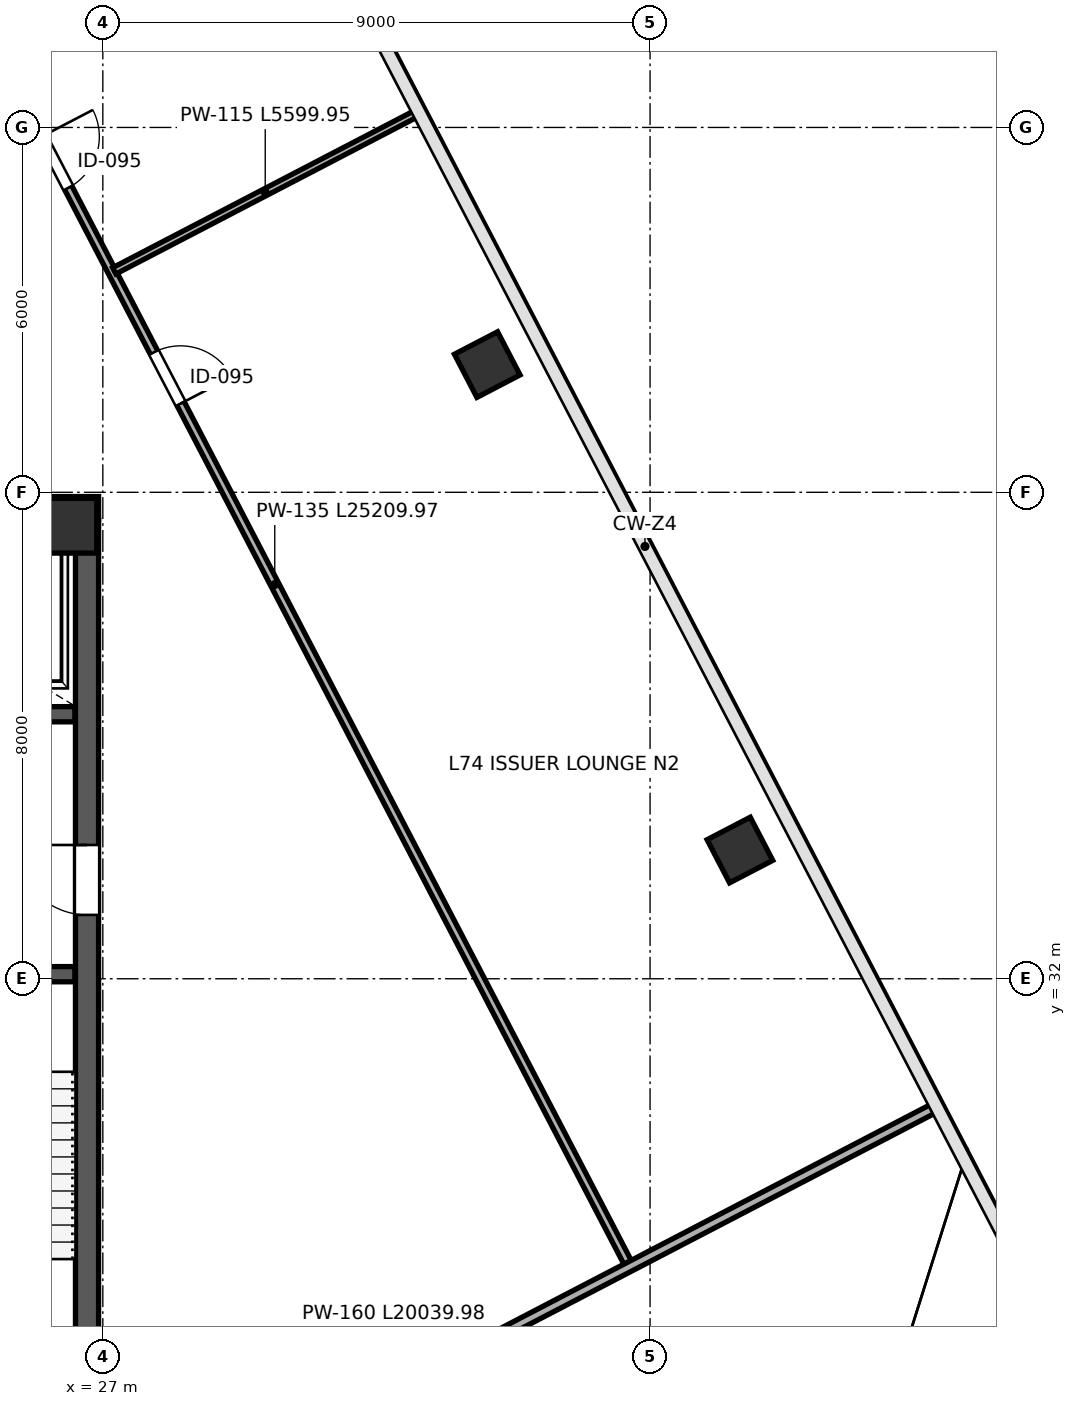
"""IFC4 building model, lengths in metres.
Left out: names, types, materials, properties, quantities, classifications, styles, units other than length and angle.
Written with IfcOpenShell. Run it as: python <this file> out.ifc"""

import sys

from ifc_helpers import new_model, si_unit, direction, frame, frame_2d, origin, origin_2d, place, context, subcontext, project, spatial, rectangle, extrude, source, transform, mapped, element, fill, save


model = new_model("IFC4")
c1 = context("Model", 3, precision=1e-05, world=origin(), true_north=direction((0.0, 1.0)))
c2 = subcontext(c1, "Body", "Model", "MODEL_VIEW")
j1 = project(units=[si_unit("LENGTHUNIT", "METRE"), si_unit("PLANEANGLEUNIT", "RADIAN")], contexts=[c1])
p1 = place(None, origin())
s1 = spatial("IfcSite", under=j1, at=p1, CompositionType="ELEMENT")
p2 = place(p1, origin())
s2 = spatial("IfcBuilding", under=s1, at=p2, CompositionType="ELEMENT")
p3 = place(p2, frame((0.0, 0.0, 328.2)))
s3 = spatial("IfcBuildingStorey", under=s2, at=p3, CompositionType="ELEMENT", Elevation=328.2)
m1 = source(origin(), c2, "Body", "SweptSolid", [
    extrude(rectangle(XDim=0.9, YDim=0.9, at=origin_2d()), origin(), (0.0, 0.0, 1.0), 4.198),
])
p4 = place(p3, frame((26.45, 39.45, 0.001), z_axis=(0.0, 0.0, 1.0), x_axis=(1.0, 0.0, 0.0)))
e1 = element("IfcColumn", 1, at=p4, inside=s3, PredefinedType="COLUMN", context=c2, shape_type="MappedRepresentation", body=[
    mapped(m1, transform((0.0, 0.0, 0.0), scale=1.0)),
])
m2 = source(origin(), c2, "Body", "SweptSolid", [
    extrude(rectangle(XDim=0.8, YDim=0.8, at=origin_2d()), origin(), (0.0, 0.0, 1.0), 4.198),
])
for number, where, z_axis, x_axis in (
    (2, (33.322, 42.1, 0.001), (0.0, 0.0, 1.0), (-0.462, 0.887, 0.0)),
    (3, (37.478, 34.117, 0.001), (0.0, 0.0, 1.0), (-0.462, 0.887, 0.0)),
):
    element("IfcColumn", number, at=place(p3, frame(where, z_axis=z_axis, x_axis=x_axis)), inside=s3, PredefinedType="COLUMN", context=c2, shape_type="MappedRepresentation", body=[
        mapped(m2, transform((0.0, 0.0, 0.0), scale=1.0)),
    ])
p5 = place(p3, frame((26.74, 24.45, 0.0), z_axis=(0.0, 0.0, 1.0), x_axis=(0.0, 1.0, 0.0)))
e4 = element("IfcWall", 4, at=p5, inside=s3, PredefinedType="SHEAR", context=c2, shape_type="SweptSolid", body=[
    extrude(rectangle(XDim=15.1, YDim=0.38, at=frame_2d((7.55, 0.0))), origin(), (0.0, 0.0, 1.0), 3.96),
])
p6 = place(p5, frame((8.6, 0.0, 0.0)))
e5 = element("IfcOpeningElement", 5, at=p6, cuts=e4, PredefinedType="OPENING", context=c2, shape_type="SweptSolid", body=[
    extrude(rectangle(XDim=1.15, YDim=2.2, at=frame_2d((0.575, 1.1))), frame((0.0, 0.2, 0.0), z_axis=(0.0, -1.0, 0.0), x_axis=(1.0, 0.0, 0.0)), (0.0, 0.0, 1.0), 0.4),
])
p7 = place(p3, frame((9.07, 39.74, 0.0), z_axis=(0.0, 0.0, 1.0), x_axis=(1.0, 0.0, 0.0)))
e6 = element("IfcWall", 6, at=p7, inside=s3, PredefinedType="SHEAR", context=c2, shape_type="SweptSolid", body=[
    extrude(rectangle(XDim=17.86, YDim=0.38, at=frame_2d((8.93, 0.0))), origin(), (0.0, 0.0, 1.0), 3.96),
])
p8 = place(p3, frame((23.19, 32.075, 0.0), z_axis=(0.0, 0.0, 1.0), x_axis=(1.0, 0.0, 0.0)))
e7 = element("IfcWall", 7, at=p8, inside=s3, PredefinedType="SHEAR", context=c2, shape_type="SweptSolid", body=[
    extrude(rectangle(XDim=3.35, YDim=0.25, at=frame_2d((1.675, 0.0))), origin(), (0.0, 0.0, 1.0), 3.96),
])
p9 = place(p8, frame((0.85, 0.0, 0.0)))
e8 = element("IfcOpeningElement", 8, at=p9, cuts=e7, PredefinedType="OPENING", context=c2, shape_type="SweptSolid", body=[
    extrude(rectangle(XDim=1.15, YDim=2.2, at=frame_2d((0.575, 1.1))), frame((0.0, 0.135, 0.0), z_axis=(0.0, -1.0, 0.0), x_axis=(1.0, 0.0, 0.0)), (0.0, 0.0, 1.0), 0.27),
])
p10 = place(p3, frame((21.45, 36.35, 0.0), z_axis=(0.0, 0.0, 1.0), x_axis=(1.0, 0.0, 0.0)))
e9 = element("IfcWall", 9, at=p10, inside=s3, PredefinedType="SHEAR", context=c2, shape_type="SweptSolid", body=[
    extrude(rectangle(XDim=5.09, YDim=0.25, at=frame_2d((2.545, 0.0))), origin(), (0.0, 0.0, 1.0), 3.96),
])
p11 = place(p10, frame((0.7, 0.0, 0.0)))
e10 = element("IfcOpeningElement", 10, at=p11, cuts=e9, PredefinedType="OPENING", context=c2, shape_type="SweptSolid", body=[
    extrude(rectangle(XDim=1.2, YDim=2.2, at=frame_2d((0.6, 1.1))), frame((0.0, 0.135, 0.0), z_axis=(0.0, -1.0, 0.0), x_axis=(1.0, 0.0, 0.0)), (0.0, 0.0, 1.0), 0.27),
])
p12 = place(p10, frame((3.25, 0.0, 0.0)))
e11 = element("IfcOpeningElement", 11, at=p12, cuts=e9, PredefinedType="OPENING", context=c2, shape_type="SweptSolid", body=[
    extrude(rectangle(XDim=1.2, YDim=2.2, at=frame_2d((0.6, 1.1))), frame((0.0, 0.135, 0.0), z_axis=(0.0, -1.0, 0.0), x_axis=(1.0, 0.0, 0.0)), (0.0, 0.0, 1.0), 0.27),
])
p13 = place(p3, frame((24.007, 49.664, 0.0), z_axis=(0.0, 0.0, 1.0), x_axis=(0.461753963132, -0.887008048178, 0.0)))
e12 = element("IfcWall", 12, at=p13, inside=s3, PredefinedType="PARTITIONING", context=c2, shape_type="SweptSolid", body=[
    extrude(rectangle(XDim=25.21, YDim=0.135, at=frame_2d((12.605, 0.0))), origin(), (0.0, 0.0, 1.0), 3.96),
])
p14 = place(p13, frame((4.3, 0.0, 0.0)))
e13 = element("IfcOpeningElement", 13, at=p14, cuts=e12, PredefinedType="OPENING", context=c2, shape_type="SweptSolid", body=[
    extrude(rectangle(XDim=0.95, YDim=2.15, at=frame_2d((0.475, 1.075))), frame((0.0, 0.078, 0.0), z_axis=(0.0, -1.0, 0.0), x_axis=(1.0, 0.0, 0.0)), (0.0, 0.0, 1.0), 0.155),
])
p15 = place(p13, frame((8.3, 0.0, 0.0)))
e14 = element("IfcOpeningElement", 14, at=p15, cuts=e12, PredefinedType="OPENING", context=c2, shape_type="SweptSolid", body=[
    extrude(rectangle(XDim=0.95, YDim=2.15, at=frame_2d((0.475, 1.075))), frame((0.0, 0.078, 0.0), z_axis=(0.0, -1.0, 0.0), x_axis=(1.0, 0.0, 0.0)), (0.0, 0.0, 1.0), 0.155),
])
p16 = place(p3, frame((27.187, 43.641, 0.0), z_axis=(0.0, 0.0, 1.0), x_axis=(0.886991844597, 0.461785088129, 0.0)))
e15 = element("IfcWall", 15, at=p16, inside=s3, PredefinedType="PARTITIONING", context=c2, shape_type="SweptSolid", body=[
    extrude(rectangle(XDim=5.6, YDim=0.115, at=frame_2d((2.8, 0.0))), origin(), (0.0, 0.0, 1.0), 3.295),
])
p17 = place(p3, frame((17.301, 46.217, 0.0), z_axis=(0.0, 0.0, 1.0), x_axis=(0.887006461695, 0.461757010679, 0.0)))
e16 = element("IfcWall", 16, at=p17, inside=s3, PredefinedType="PARTITIONING", context=c2, shape_type="SweptSolid", body=[
    extrude(rectangle(XDim=12.472, YDim=0.1, at=frame_2d((6.236, 0.0))), origin(), (0.0, 0.0, 1.0), 3.96),
])
p18 = place(p3, frame((22.893, 20.617, 0.0), z_axis=(0.0, 0.0, 1.0), x_axis=(0.887013262899, 0.461743945755, 0.0)))
e17 = element("IfcWall", 17, at=p18, inside=s3, PredefinedType="PARTITIONING", context=c2, shape_type="SweptSolid", body=[
    extrude(rectangle(XDim=20.04, YDim=0.16, at=frame_2d((10.02, 0.0))), origin(), (0.0, 0.0, 1.0), 3.96),
])
p19 = place(p3, frame((24.662, 17.22, 0.0), z_axis=(0.0, 0.0, 1.0), x_axis=(0.887015173056, 0.461740276312, 0.0)))
e18 = element("IfcWall", 18, at=p19, inside=s3, PredefinedType="PARTITIONING", context=c2, shape_type="SweptSolid", body=[
    extrude(rectangle(XDim=20.012, YDim=0.115, at=frame_2d((10.006, 0.0))), origin(), (0.0, 0.0, 1.0), 2.795),
])
m3 = source(origin(), c2, "Body", "SweptSolid", [
    extrude(rectangle(XDim=1.15, YDim=2.2, at=frame_2d((0.575, 1.1))), frame((0.0, 0.025, 0.0), z_axis=(0.0, -1.0, 0.0), x_axis=(1.0, 0.0, 0.0)), (0.0, 0.0, 1.0), 0.05),
])
p20 = place(p6, origin())
e19 = element("IfcDoor", 19, at=p20, inside=s3, OperationType="SINGLE_SWING_RIGHT", PredefinedType="DOOR", context=c2, shape_type="MappedRepresentation", body=[
    mapped(m3, transform((0.0, 0.0, 0.0), scale=1.0)),
])
fill(e5, e19)
m4 = source(origin(), c2, "Body", "SweptSolid", [
    extrude(rectangle(XDim=0.95, YDim=2.15, at=frame_2d((0.475, 1.075))), frame((0.0, 0.025, 0.0), z_axis=(0.0, -1.0, 0.0), x_axis=(1.0, 0.0, 0.0)), (0.0, 0.0, 1.0), 0.05),
])
p21 = place(p14, origin())
e20 = element("IfcDoor", 20, at=p21, inside=s3, OperationType="SINGLE_SWING_LEFT", PredefinedType="DOOR", context=c2, shape_type="MappedRepresentation", body=[
    mapped(m4, transform((0.0, 0.0, 0.0), scale=1.0)),
])
fill(e13, e20)
p22 = place(p15, origin())
e21 = element("IfcDoor", 21, at=p22, inside=s3, OperationType="SINGLE_SWING_RIGHT", PredefinedType="DOOR", context=c2, shape_type="MappedRepresentation", body=[
    mapped(m4, transform((0.0, 0.0, 0.0), scale=1.0)),
])
fill(e14, e21)
save(model, sys.argv[1])
